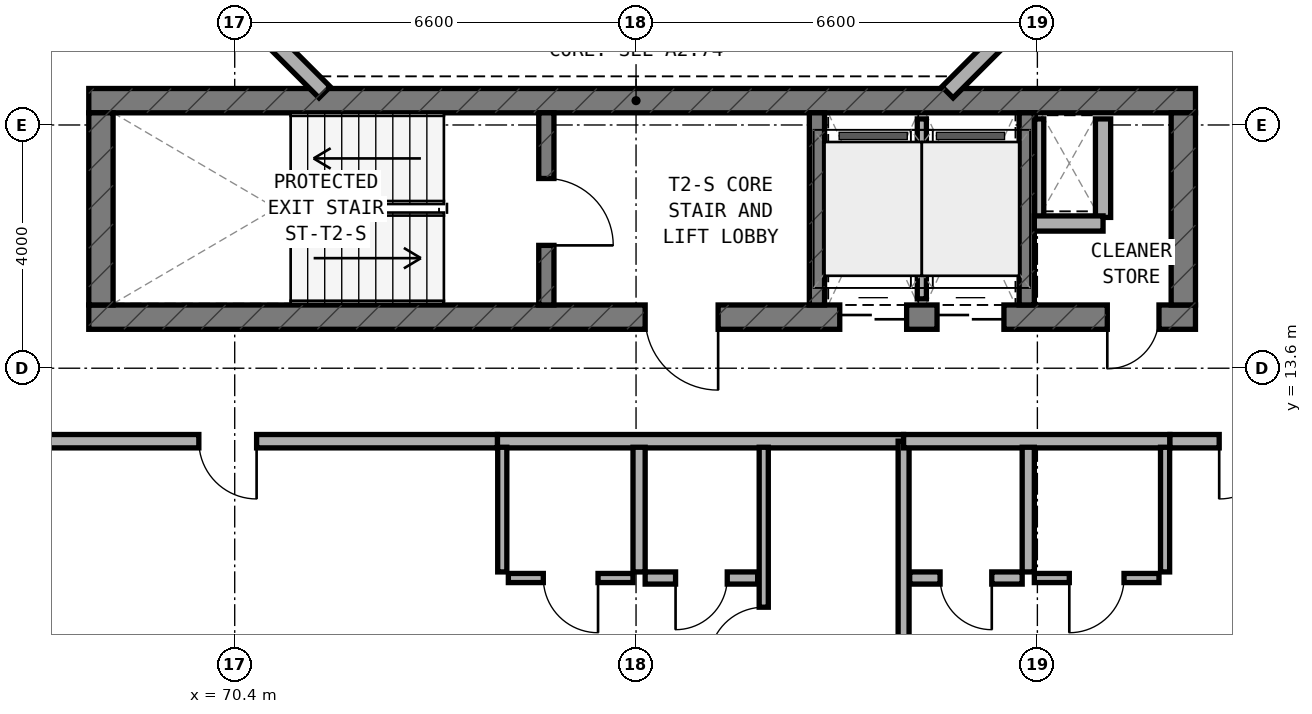
"""IFC4 building model, lengths in metres.
Left out: names, types, materials, properties, quantities, classifications, styles, units other than length and angle.
Written with IfcOpenShell. Run it as: python <this file> out.ifc"""

import sys

from ifc_helpers import new_model, si_unit, direction, frame, frame_2d, origin, place, context, subcontext, project, spatial, rectangle, extrude, element, fill, save


model = new_model("IFC4")
c1 = context("Model", 3, precision=1e-05, world=origin(), true_north=direction((0.0, 1.0)))
c2 = subcontext(c1, "Body", "Model", "MODEL_VIEW")
j1 = project(units=[si_unit("LENGTHUNIT", "METRE"), si_unit("PLANEANGLEUNIT", "RADIAN")], contexts=[c1])
p1 = place(None, origin())
s1 = spatial("IfcSite", under=j1, at=p1, CompositionType="ELEMENT")
p2 = place(p1, origin())
s2 = spatial("IfcBuilding", under=s1, at=p2, CompositionType="ELEMENT")
p3 = place(p2, frame((0.0, 0.0, 112.5)))
s3 = spatial("IfcBuildingStorey", under=s2, at=p3, CompositionType="ELEMENT", Elevation=112.5)
p4 = place(p3, frame((68.0, 14.44, 0.0), z_axis=(0.0, 0.0, 1.0), x_axis=(1.0, 0.0, 0.0)))
e1 = element("IfcWall", 1, at=p4, inside=s3, PredefinedType="SHEAR", context=c2, shape_type="SweptSolid", body=[
    extrude(rectangle(XDim=18.2, YDim=0.4, at=frame_2d((9.1, 0.0))), origin(), (0.0, 0.0, 1.0), 3.5),
])
p5 = place(p4, frame((9.15, 0.0, 0.0)))
e2 = element("IfcOpeningElement", 2, at=p5, cuts=e1, PredefinedType="OPENING", context=c2, shape_type="SweptSolid", body=[
    extrude(rectangle(XDim=1.2, YDim=2.15, at=frame_2d((0.6, 1.075))), frame((0.0, 0.21, 0.0), z_axis=(0.0, -1.0, 0.0), x_axis=(1.0, 0.0, 0.0)), (0.0, 0.0, 1.0), 0.42),
])
p6 = place(p4, frame((16.75, 0.0, 0.0)))
e3 = element("IfcOpeningElement", 3, at=p6, cuts=e1, PredefinedType="OPENING", context=c2, shape_type="SweptSolid", body=[
    extrude(rectangle(XDim=0.85, YDim=2.1, at=frame_2d((0.425, 1.05))), frame((0.0, 0.21, 0.0), z_axis=(0.0, -1.0, 0.0), x_axis=(1.0, 0.0, 0.0)), (0.0, 0.0, 1.0), 0.42),
])
p7 = place(p4, frame((12.35, 0.0, 0.0)))
e4 = element("IfcOpeningElement", 4, at=p7, cuts=e1, PredefinedType="OPENING", context=c2, shape_type="SweptSolid", body=[
    extrude(rectangle(XDim=1.1, YDim=2.15, at=frame_2d((0.55, 1.075))), frame((0.0, 0.21, 0.0), z_axis=(0.0, -1.0, 0.0), x_axis=(1.0, 0.0, 0.0)), (0.0, 0.0, 1.0), 0.42),
])
p8 = place(p4, frame((13.95, 0.0, 0.0)))
e5 = element("IfcOpeningElement", 5, at=p8, cuts=e1, PredefinedType="OPENING", context=c2, shape_type="SweptSolid", body=[
    extrude(rectangle(XDim=1.1, YDim=2.15, at=frame_2d((0.55, 1.075))), frame((0.0, 0.21, 0.0), z_axis=(0.0, -1.0, 0.0), x_axis=(1.0, 0.0, 0.0)), (0.0, 0.0, 1.0), 0.42),
])
p9 = place(p3, frame((68.0, 18.0, 0.0), z_axis=(0.0, 0.0, 1.0), x_axis=(1.0, 0.0, 0.0)))
e6 = element("IfcWall", 6, at=p9, inside=s3, PredefinedType="SHEAR", context=c2, shape_type="SweptSolid", body=[
    extrude(rectangle(XDim=18.2, YDim=0.4, at=frame_2d((9.1, 0.0))), origin(), (0.0, 0.0, 1.0), 3.5),
])
for number, where, z_axis, x_axis in (
    (7, (68.2, 14.64, 0.0), (0.0, 0.0, 1.0), (0.0, 1.0, 0.0)),
    (8, (86.0, 14.64, 0.0), (0.0, 0.0, 1.0), (0.0, 1.0, 0.0)),
):
    element("IfcWall", number, at=place(p3, frame(where, z_axis=z_axis, x_axis=x_axis)), inside=s3, PredefinedType="SHEAR", context=c2, shape_type="SweptSolid", body=[
        extrude(rectangle(XDim=3.16, YDim=0.4, at=frame_2d((1.58, 0.0))), origin(), (0.0, 0.0, 1.0), 3.5),
    ])
p10 = place(p3, frame((75.525, 14.64, 0.0), z_axis=(0.0, 0.0, 1.0), x_axis=(0.0, 1.0, 0.0)))
e9 = element("IfcWall", 9, at=p10, inside=s3, PredefinedType="STANDARD", context=c2, shape_type="SweptSolid", body=[
    extrude(rectangle(XDim=3.16, YDim=0.25, at=frame_2d((1.58, 0.0))), origin(), (0.0, 0.0, 1.0), 3.25),
])
p11 = place(p10, frame((0.98, 0.0, 0.0)))
e10 = element("IfcOpeningElement", 10, at=p11, cuts=e9, PredefinedType="OPENING", context=c2, shape_type="SweptSolid", body=[
    extrude(rectangle(XDim=1.1, YDim=2.15, at=frame_2d((0.55, 1.075))), frame((0.0, 0.135, 0.0), z_axis=(0.0, -1.0, 0.0), x_axis=(1.0, 0.0, 0.0)), (0.0, 0.0, 1.0), 0.27),
])
for number, where, z_axis, x_axis in (
    (11, (79.975, 14.64, 0.0), (0.0, 0.0, 1.0), (0.0, 1.0, 0.0)),
    (12, (83.425, 14.64, 0.0), (0.0, 0.0, 1.0), (0.0, 1.0, 0.0)),
):
    element("IfcWall", number, at=place(p3, frame(where, z_axis=z_axis, x_axis=x_axis)), inside=s3, PredefinedType="STANDARD", context=c2, shape_type="SweptSolid", body=[
        extrude(rectangle(XDim=3.16, YDim=0.25, at=frame_2d((1.58, 0.0))), origin(), (0.0, 0.0, 1.0), 3.25),
    ])
for number, where, z_axis, x_axis in (
    (13, (82.122, 18.138, 0.0), (0.0, 0.0, 1.0), (0.707, 0.707, 0.0)),
    (14, (70.244, 19.772, 0.0), (0.0, 0.0, 1.0), (0.707, -0.707, 0.0)),
):
    element("IfcWall", number, at=place(p3, frame(where, z_axis=z_axis, x_axis=x_axis)), inside=s3, PredefinedType="STANDARD", context=c2, shape_type="SweptSolid", body=[
        extrude(rectangle(XDim=2.311, YDim=0.26, at=frame_2d((1.155, 0.0))), origin(), (0.0, 0.0, 1.0), 3.25),
    ])
p12 = place(p3, frame((83.63, 16.08, 0.0), z_axis=(0.0, 0.0, 1.0), x_axis=(0.0, 1.0, 0.0)))
e15 = element("IfcWall", 15, at=p12, inside=s3, PredefinedType="PARTITIONING", context=c2, shape_type="SweptSolid", body=[
    extrude(rectangle(XDim=1.62, YDim=0.15, at=frame_2d((0.81, 0.0))), origin(), (0.0, 0.0, 1.0), 2.825),
])
p13 = place(p3, frame((84.68, 16.08, 0.0), z_axis=(0.0, 0.0, 1.0), x_axis=(0.0, 1.0, 0.0)))
e16 = element("IfcWall", 16, at=p13, inside=s3, PredefinedType="SOLIDWALL", context=c2, shape_type="SweptSolid", body=[
    extrude(rectangle(XDim=1.62, YDim=0.25, at=frame_2d((0.81, 0.0))), origin(), (0.0, 0.0, 1.0), 3.22),
])
p14 = place(p3, frame((83.55, 15.98, 0.0), z_axis=(0.0, 0.0, 1.0), x_axis=(1.0, 0.0, 0.0)))
e17 = element("IfcWall", 17, at=p14, inside=s3, PredefinedType="SOLIDWALL", context=c2, shape_type="SweptSolid", body=[
    extrude(rectangle(XDim=1.13, YDim=0.25, at=frame_2d((0.565, 0.0))), origin(), (0.0, 0.0, 1.0), 3.22),
])
p15 = place(p3, frame((81.7, 14.74, 0.0), z_axis=(0.0, 0.0, 1.0), x_axis=(0.0, 1.0, 0.0)))
e18 = element("IfcWall", 18, at=p15, inside=s3, PredefinedType="PARTITIONING", context=c2, shape_type="SweptSolid", body=[
    extrude(rectangle(XDim=2.96, YDim=0.15, at=frame_2d((1.48, 0.0))), origin(), (0.0, 0.0, 1.0), 3.22),
])
p16 = place(p3, frame((74.72, 12.4, 0.0), z_axis=(0.0, 0.0, 1.0), x_axis=(1.0, 0.0, 0.0)))
e19 = element("IfcWall", 19, at=p16, inside=s3, PredefinedType="SOLIDWALL", context=c2, shape_type="SweptSolid", body=[
    extrude(rectangle(XDim=6.68, YDim=0.22, at=frame_2d((3.34, 0.0))), origin(), (0.0, 0.0, 1.0), 2.825),
])
p17 = place(p3, frame((65.85, 12.4, 0.0), z_axis=(0.0, 0.0, 1.0), x_axis=(1.0, 0.0, 0.0)))
e20 = element("IfcWall", 20, at=p17, inside=s3, PredefinedType="SOLIDWALL", context=c2, shape_type="SweptSolid", body=[
    extrude(rectangle(XDim=8.87, YDim=0.22, at=frame_2d((4.435, 0.0))), origin(), (0.0, 0.0, 1.0), 2.825),
])
p18 = place(p17, frame((3.96, 0.0, 0.0)))
e21 = element("IfcOpeningElement", 21, at=p18, cuts=e20, PredefinedType="OPENING", context=c2, shape_type="SweptSolid", body=[
    extrude(rectangle(XDim=0.95, YDim=2.1, at=frame_2d((0.475, 1.05))), frame((0.0, 0.12, 0.0), z_axis=(0.0, -1.0, 0.0), x_axis=(1.0, 0.0, 0.0)), (0.0, 0.0, 1.0), 0.24),
])
p19 = place(p3, frame((79.1, 6.76, 0.0), z_axis=(0.0, 0.0, 1.0), x_axis=(0.0, 1.0, 0.0)))
e22 = element("IfcWall", 22, at=p19, inside=s3, PredefinedType="PARTITIONING", context=c2, shape_type="SweptSolid", body=[
    extrude(rectangle(XDim=5.54, YDim=0.15, at=frame_2d((2.77, 0.0))), origin(), (0.0, 0.0, 1.0), 2.895),
])
p20 = place(p19, frame((2.01, 0.0, 0.0)))
e23 = element("IfcOpeningElement", 23, at=p20, cuts=e22, PredefinedType="OPENING", context=c2, shape_type="SweptSolid", body=[
    extrude(rectangle(XDim=0.9, YDim=2.1, at=frame_2d((0.45, 1.05))), frame((0.0, 0.085, 0.0), z_axis=(0.0, -1.0, 0.0), x_axis=(1.0, 0.0, 0.0)), (0.0, 0.0, 1.0), 0.17),
])
p21 = place(p3, frame((77.05, 10.25, 0.0), z_axis=(0.0, 0.0, 1.0), x_axis=(0.0, 1.0, 0.0)))
e24 = element("IfcWall", 24, at=p21, inside=s3, PredefinedType="PLUMBINGWALL", context=c2, shape_type="SweptSolid", body=[
    extrude(rectangle(XDim=2.05, YDim=0.2, at=frame_2d((1.025, 0.0))), origin(), (0.0, 0.0, 1.0), 2.895),
])
p22 = place(p3, frame((74.8, 10.25, 0.0), z_axis=(0.0, 0.0, 1.0), x_axis=(0.0, 1.0, 0.0)))
e25 = element("IfcWall", 25, at=p22, inside=s3, PredefinedType="PARTITIONING", context=c2, shape_type="SweptSolid", body=[
    extrude(rectangle(XDim=2.05, YDim=0.15, at=frame_2d((1.025, 0.0))), origin(), (0.0, 0.0, 1.0), 2.895),
])
p23 = place(p3, frame((77.15, 10.15, 0.0), z_axis=(0.0, 0.0, 1.0), x_axis=(1.0, 0.0, 0.0)))
e26 = element("IfcWall", 26, at=p23, inside=s3, PredefinedType="PLUMBINGWALL", context=c2, shape_type="SweptSolid", body=[
    extrude(rectangle(XDim=1.85, YDim=0.2, at=frame_2d((0.925, 0.0))), origin(), (0.0, 0.0, 1.0), 3.22),
])
p24 = place(p23, frame((0.5, 0.0, 0.0)))
e27 = element("IfcOpeningElement", 27, at=p24, cuts=e26, PredefinedType="OPENING", context=c2, shape_type="SweptSolid", body=[
    extrude(rectangle(XDim=0.85, YDim=2.1, at=frame_2d((0.425, 1.05))), frame((0.0, 0.11, 0.0), z_axis=(0.0, -1.0, 0.0), x_axis=(1.0, 0.0, 0.0)), (0.0, 0.0, 1.0), 0.22),
])
p25 = place(p3, frame((74.9, 10.15, 0.0), z_axis=(0.0, 0.0, 1.0), x_axis=(1.0, 0.0, 0.0)))
e28 = element("IfcWall", 28, at=p25, inside=s3, PredefinedType="PARTITIONING", context=c2, shape_type="SweptSolid", body=[
    extrude(rectangle(XDim=2.05, YDim=0.15, at=frame_2d((1.025, 0.0))), origin(), (0.0, 0.0, 1.0), 3.22),
])
p26 = place(p25, frame((0.575, 0.0, 0.0)))
e29 = element("IfcOpeningElement", 29, at=p26, cuts=e28, PredefinedType="OPENING", context=c2, shape_type="SweptSolid", body=[
    extrude(rectangle(XDim=0.9, YDim=2.1, at=frame_2d((0.45, 1.05))), frame((0.0, 0.085, 0.0), z_axis=(0.0, -1.0, 0.0), x_axis=(1.0, 0.0, 0.0)), (0.0, 0.0, 1.0), 0.17),
])
p27 = place(p3, frame((81.4, 6.66, 0.0), z_axis=(0.0, 0.0, 1.0), x_axis=(0.0, 1.0, 0.0)))
e30 = element("IfcWall", 30, at=p27, inside=s3, PredefinedType="SOLIDWALL", context=c2, shape_type="SweptSolid", body=[
    extrude(rectangle(XDim=5.74, YDim=0.18, at=frame_2d((2.87, 0.0))), origin(), (0.0, 0.0, 1.0), 2.825),
])
p28 = place(p3, frame((81.4, 12.4, 0.0), z_axis=(0.0, 0.0, 1.0), x_axis=(1.0, 0.0, 0.0)))
e31 = element("IfcWall", 31, at=p28, inside=s3, PredefinedType="SOLIDWALL", context=c2, shape_type="SweptSolid", body=[
    extrude(rectangle(XDim=4.38, YDim=0.22, at=frame_2d((2.19, 0.0))), origin(), (0.0, 0.0, 1.0), 2.825),
])
p29 = place(p3, frame((85.78, 12.4, 0.0), z_axis=(0.0, 0.0, 1.0), x_axis=(1.0, 0.0, 0.0)))
e32 = element("IfcWall", 32, at=p29, inside=s3, PredefinedType="SOLIDWALL", context=c2, shape_type="SweptSolid", body=[
    extrude(rectangle(XDim=2.57, YDim=0.22, at=frame_2d((1.285, 0.0))), origin(), (0.0, 0.0, 1.0), 3.22),
])
p30 = place(p29, frame((0.81, 0.0, 0.0)))
e33 = element("IfcOpeningElement", 33, at=p30, cuts=e32, PredefinedType="OPENING", context=c2, shape_type="SweptSolid", body=[
    extrude(rectangle(XDim=0.95, YDim=2.1, at=frame_2d((0.475, 1.05))), frame((0.0, 0.12, 0.0), z_axis=(0.0, -1.0, 0.0), x_axis=(1.0, 0.0, 0.0)), (0.0, 0.0, 1.0), 0.24),
])
p31 = place(p3, frame((83.45, 10.25, 0.0), z_axis=(0.0, 0.0, 1.0), x_axis=(0.0, 1.0, 0.0)))
e34 = element("IfcWall", 34, at=p31, inside=s3, PredefinedType="PLUMBINGWALL", context=c2, shape_type="SweptSolid", body=[
    extrude(rectangle(XDim=2.05, YDim=0.2, at=frame_2d((1.025, 0.0))), origin(), (0.0, 0.0, 1.0), 3.22),
])
p32 = place(p3, frame((85.7, 10.25, 0.0), z_axis=(0.0, 0.0, 1.0), x_axis=(0.0, 1.0, 0.0)))
e35 = element("IfcWall", 35, at=p32, inside=s3, PredefinedType="PARTITIONING", context=c2, shape_type="SweptSolid", body=[
    extrude(rectangle(XDim=2.05, YDim=0.15, at=frame_2d((1.025, 0.0))), origin(), (0.0, 0.0, 1.0), 3.22),
])
p33 = place(p3, frame((81.5, 10.15, 0.0), z_axis=(0.0, 0.0, 1.0), x_axis=(1.0, 0.0, 0.0)))
e36 = element("IfcWall", 36, at=p33, inside=s3, PredefinedType="PLUMBINGWALL", context=c2, shape_type="SweptSolid", body=[
    extrude(rectangle(XDim=1.85, YDim=0.2, at=frame_2d((0.925, 0.0))), origin(), (0.0, 0.0, 1.0), 2.825),
])
p34 = place(p33, frame((0.5, 0.0, 0.0)))
e37 = element("IfcOpeningElement", 37, at=p34, cuts=e36, PredefinedType="OPENING", context=c2, shape_type="SweptSolid", body=[
    extrude(rectangle(XDim=0.85, YDim=2.1, at=frame_2d((0.425, 1.05))), frame((0.0, 0.11, 0.0), z_axis=(0.0, -1.0, 0.0), x_axis=(1.0, 0.0, 0.0)), (0.0, 0.0, 1.0), 0.22),
])
p35 = place(p3, frame((83.55, 10.15, 0.0), z_axis=(0.0, 0.0, 1.0), x_axis=(1.0, 0.0, 0.0)))
e38 = element("IfcWall", 38, at=p35, inside=s3, PredefinedType="PARTITIONING", context=c2, shape_type="SweptSolid", body=[
    extrude(rectangle(XDim=2.05, YDim=0.15, at=frame_2d((1.025, 0.0))), origin(), (0.0, 0.0, 1.0), 3.22),
])
p36 = place(p35, frame((0.575, 0.0, 0.0)))
e39 = element("IfcOpeningElement", 39, at=p36, cuts=e38, PredefinedType="OPENING", context=c2, shape_type="SweptSolid", body=[
    extrude(rectangle(XDim=0.9, YDim=2.1, at=frame_2d((0.45, 1.05))), frame((0.0, 0.085, 0.0), z_axis=(0.0, -1.0, 0.0), x_axis=(1.0, 0.0, 0.0)), (0.0, 0.0, 1.0), 0.17),
])
p37 = place(p11, frame((1.1, 0.0, 0.0), z_axis=(0.0, 0.0, 1.0), x_axis=(-1.0, 0.0, 0.0)))
e40 = element("IfcDoor", 40, at=p37, inside=s3, OperationType="SINGLE_SWING_RIGHT", PredefinedType="DOOR", context=c2, shape_type="SweptSolid", body=[
    extrude(rectangle(XDim=1.1, YDim=2.15, at=frame_2d((0.55, 1.075))), frame((0.0, 0.025, 0.0), z_axis=(0.0, -1.0, 0.0), x_axis=(1.0, 0.0, 0.0)), (0.0, 0.0, 1.0), 0.05),
])
fill(e10, e40)
p38 = place(p5, frame((1.2, 0.0, 0.0), z_axis=(0.0, 0.0, 1.0), x_axis=(-1.0, 0.0, 0.0)))
e41 = element("IfcDoor", 41, at=p38, inside=s3, OperationType="SINGLE_SWING_LEFT", PredefinedType="DOOR", context=c2, shape_type="SweptSolid", body=[
    extrude(rectangle(XDim=1.2, YDim=2.15, at=frame_2d((0.6, 1.075))), frame((0.0, 0.025, 0.0), z_axis=(0.0, -1.0, 0.0), x_axis=(1.0, 0.0, 0.0)), (0.0, 0.0, 1.0), 0.05),
])
fill(e2, e41)
p39 = place(p6, frame((0.85, 0.0, 0.0), z_axis=(0.0, 0.0, 1.0), x_axis=(-1.0, 0.0, 0.0)))
e42 = element("IfcDoor", 42, at=p39, inside=s3, OperationType="SINGLE_SWING_RIGHT", PredefinedType="DOOR", context=c2, shape_type="SweptSolid", body=[
    extrude(rectangle(XDim=0.85, YDim=2.1, at=frame_2d((0.425, 1.05))), frame((0.0, 0.025, 0.0), z_axis=(0.0, -1.0, 0.0), x_axis=(1.0, 0.0, 0.0)), (0.0, 0.0, 1.0), 0.05),
])
fill(e3, e42)
p40 = place(p7, frame((1.1, 0.0, 0.0), z_axis=(0.0, 0.0, 1.0), x_axis=(-1.0, 0.0, 0.0)))
e43 = element("IfcDoor", 43, at=p40, inside=s3, OperationType="DOUBLE_DOOR_SLIDING", PredefinedType="DOOR", context=c2, shape_type="SweptSolid", body=[
    extrude(rectangle(XDim=1.1, YDim=2.15, at=frame_2d((0.55, 1.075))), frame((0.0, 0.025, 0.0), z_axis=(0.0, -1.0, 0.0), x_axis=(1.0, 0.0, 0.0)), (0.0, 0.0, 1.0), 0.05),
])
fill(e4, e43)
p41 = place(p8, frame((1.1, 0.0, 0.0), z_axis=(0.0, 0.0, 1.0), x_axis=(-1.0, 0.0, 0.0)))
e44 = element("IfcDoor", 44, at=p41, inside=s3, OperationType="DOUBLE_DOOR_SLIDING", PredefinedType="DOOR", context=c2, shape_type="SweptSolid", body=[
    extrude(rectangle(XDim=1.1, YDim=2.15, at=frame_2d((0.55, 1.075))), frame((0.0, 0.025, 0.0), z_axis=(0.0, -1.0, 0.0), x_axis=(1.0, 0.0, 0.0)), (0.0, 0.0, 1.0), 0.05),
])
fill(e5, e44)
p42 = place(p18, frame((0.95, 0.0, 0.0), z_axis=(0.0, 0.0, 1.0), x_axis=(-1.0, 0.0, 0.0)))
e45 = element("IfcDoor", 45, at=p42, inside=s3, OperationType="SINGLE_SWING_LEFT", PredefinedType="DOOR", context=c2, shape_type="SweptSolid", body=[
    extrude(rectangle(XDim=0.95, YDim=2.1, at=frame_2d((0.475, 1.05))), frame((0.0, 0.025, 0.0), z_axis=(0.0, -1.0, 0.0), x_axis=(1.0, 0.0, 0.0)), (0.0, 0.0, 1.0), 0.05),
])
fill(e21, e45)
p43 = place(p20, origin())
e46 = element("IfcDoor", 46, at=p43, inside=s3, OperationType="SINGLE_SWING_LEFT", PredefinedType="DOOR", context=c2, shape_type="SweptSolid", body=[
    extrude(rectangle(XDim=0.9, YDim=2.1, at=frame_2d((0.45, 1.05))), frame((0.0, 0.025, 0.0), z_axis=(0.0, -1.0, 0.0), x_axis=(1.0, 0.0, 0.0)), (0.0, 0.0, 1.0), 0.05),
])
fill(e23, e46)
p44 = place(p24, frame((0.85, 0.0, 0.0), z_axis=(0.0, 0.0, 1.0), x_axis=(-1.0, 0.0, 0.0)))
e47 = element("IfcDoor", 47, at=p44, inside=s3, OperationType="SINGLE_SWING_RIGHT", PredefinedType="DOOR", context=c2, shape_type="SweptSolid", body=[
    extrude(rectangle(XDim=0.85, YDim=2.1, at=frame_2d((0.425, 1.05))), frame((0.0, 0.025, 0.0), z_axis=(0.0, -1.0, 0.0), x_axis=(1.0, 0.0, 0.0)), (0.0, 0.0, 1.0), 0.05),
])
fill(e27, e47)
p45 = place(p26, frame((0.9, 0.0, 0.0), z_axis=(0.0, 0.0, 1.0), x_axis=(-1.0, 0.0, 0.0)))
e48 = element("IfcDoor", 48, at=p45, inside=s3, OperationType="SINGLE_SWING_LEFT", PredefinedType="DOOR", context=c2, shape_type="SweptSolid", body=[
    extrude(rectangle(XDim=0.9, YDim=2.1, at=frame_2d((0.45, 1.05))), frame((0.0, 0.025, 0.0), z_axis=(0.0, -1.0, 0.0), x_axis=(1.0, 0.0, 0.0)), (0.0, 0.0, 1.0), 0.05),
])
fill(e29, e48)
p46 = place(p30, frame((0.95, 0.0, 0.0), z_axis=(0.0, 0.0, 1.0), x_axis=(-1.0, 0.0, 0.0)))
e49 = element("IfcDoor", 49, at=p46, inside=s3, OperationType="SINGLE_SWING_RIGHT", PredefinedType="DOOR", context=c2, shape_type="SweptSolid", body=[
    extrude(rectangle(XDim=0.95, YDim=2.1, at=frame_2d((0.475, 1.05))), frame((0.0, 0.025, 0.0), z_axis=(0.0, -1.0, 0.0), x_axis=(1.0, 0.0, 0.0)), (0.0, 0.0, 1.0), 0.05),
])
fill(e33, e49)
p47 = place(p34, frame((0.85, 0.0, 0.0), z_axis=(0.0, 0.0, 1.0), x_axis=(-1.0, 0.0, 0.0)))
e50 = element("IfcDoor", 50, at=p47, inside=s3, OperationType="SINGLE_SWING_LEFT", PredefinedType="DOOR", context=c2, shape_type="SweptSolid", body=[
    extrude(rectangle(XDim=0.85, YDim=2.1, at=frame_2d((0.425, 1.05))), frame((0.0, 0.025, 0.0), z_axis=(0.0, -1.0, 0.0), x_axis=(1.0, 0.0, 0.0)), (0.0, 0.0, 1.0), 0.05),
])
fill(e37, e50)
p48 = place(p36, frame((0.9, 0.0, 0.0), z_axis=(0.0, 0.0, 1.0), x_axis=(-1.0, 0.0, 0.0)))
e51 = element("IfcDoor", 51, at=p48, inside=s3, OperationType="SINGLE_SWING_RIGHT", PredefinedType="DOOR", context=c2, shape_type="SweptSolid", body=[
    extrude(rectangle(XDim=0.9, YDim=2.1, at=frame_2d((0.45, 1.05))), frame((0.0, 0.025, 0.0), z_axis=(0.0, -1.0, 0.0), x_axis=(1.0, 0.0, 0.0)), (0.0, 0.0, 1.0), 0.05),
])
fill(e39, e51)
save(model, sys.argv[1])
